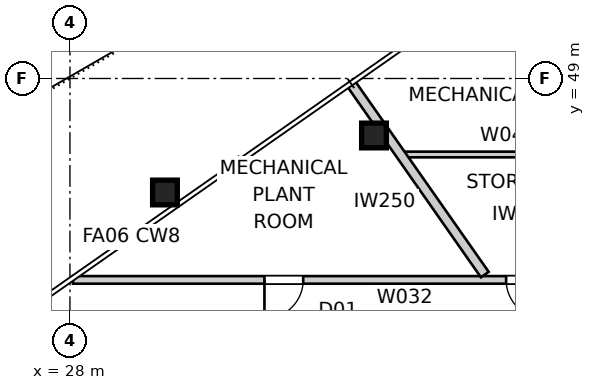
"""IFC4 building model, lengths in metres.
Left out: names, types, materials, properties, quantities, classifications, styles, units other than length and angle.
Written with IfcOpenShell. Run it as: python <this file> out.ifc"""

import sys

from ifc_helpers import new_model, si_unit, direction, frame, frame_2d, origin, origin_2d, place, context, subcontext, project, spatial, rectangle, extrude, element, fill, save


model = new_model("IFC4")
c1 = context("Model", 3, precision=1e-05, world=origin(), true_north=direction((0.0, 1.0)))
c2 = subcontext(c1, "Body", "Model", "MODEL_VIEW")
j1 = project(units=[si_unit("LENGTHUNIT", "METRE"), si_unit("PLANEANGLEUNIT", "RADIAN")], contexts=[c1])
p1 = place(None, origin())
s1 = spatial("IfcSite", under=j1, at=p1, CompositionType="ELEMENT")
p2 = place(p1, origin())
s2 = spatial("IfcBuilding", under=s1, at=p2, CompositionType="ELEMENT")
p3 = place(p2, frame((0.0, 0.0, 235.4)))
s3 = spatial("IfcBuildingStorey", under=s2, at=p3, CompositionType="ELEMENT", Elevation=235.4)
for number, where, z_axis, x_axis in (
    (1, (36.0, 47.5, 0.0), (0.0, 0.0, 1.0), (1.0, 0.0, 0.0)),
    (2, (30.5, 46.0, 0.0), (0.0, 0.0, 1.0), (1.0, 0.0, 0.0)),
):
    element("IfcColumn", number, at=place(p3, frame(where, z_axis=z_axis, x_axis=x_axis)), inside=s3, PredefinedType="COLUMN", context=c2, shape_type="SweptSolid", body=[
        extrude(rectangle(XDim=0.65, YDim=0.65, at=origin_2d()), origin(), (0.0, 0.0, 1.0), 5.0),
    ])
p4 = place(p3, frame((52.454, 43.7, 0.0), z_axis=(0.0, 0.0, 1.0), x_axis=(-1.0, 0.0, 0.0)))
e3 = element("IfcWall", 3, at=p4, inside=s3, PredefinedType="PARTITIONING", context=c2, shape_type="SweptSolid", body=[
    extrude(rectangle(XDim=24.375, YDim=0.2, at=frame_2d((12.188, 0.0))), origin(), (0.0, 0.0, 1.0), 4.85),
])
p5 = place(p4, frame((18.317, 0.0, 0.0)))
e4 = element("IfcOpeningElement", 4, at=p5, cuts=e3, PredefinedType="OPENING", context=c2, shape_type="SweptSolid", body=[
    extrude(rectangle(XDim=1.02, YDim=2.34, at=frame_2d((0.51, 1.17))), frame((0.0, 0.11, 0.0), z_axis=(0.0, -1.0, 0.0), x_axis=(1.0, 0.0, 0.0)), (0.0, 0.0, 1.0), 0.22),
])
p6 = place(p4, frame((2.31, 0.0, 0.0)))
e5 = element("IfcOpeningElement", 5, at=p6, cuts=e3, PredefinedType="OPENING", context=c2, shape_type="SweptSolid", body=[
    extrude(rectangle(XDim=1.02, YDim=2.34, at=frame_2d((0.51, 1.17))), frame((0.0, 0.11, 0.0), z_axis=(0.0, -1.0, 0.0), x_axis=(1.0, 0.0, 0.0)), (0.0, 0.0, 1.0), 0.22),
])
p7 = place(p4, frame((9.119, 0.0, 0.0)))
e6 = element("IfcOpeningElement", 6, at=p7, cuts=e3, PredefinedType="OPENING", context=c2, shape_type="SweptSolid", body=[
    extrude(rectangle(XDim=1.02, YDim=2.34, at=frame_2d((0.51, 1.17))), frame((0.0, 0.11, 0.0), z_axis=(0.0, -1.0, 0.0), x_axis=(1.0, 0.0, 0.0)), (0.0, 0.0, 1.0), 0.22),
])
p8 = place(p4, frame((5.934, 0.0, 0.0)))
e7 = element("IfcOpeningElement", 7, at=p8, cuts=e3, PredefinedType="OPENING", context=c2, shape_type="SweptSolid", body=[
    extrude(rectangle(XDim=1.02, YDim=2.34, at=frame_2d((0.51, 1.17))), frame((0.0, 0.11, 0.0), z_axis=(0.0, -1.0, 0.0), x_axis=(1.0, 0.0, 0.0)), (0.0, 0.0, 1.0), 0.22),
])
p9 = place(p4, frame((11.957, 0.0, 0.0)))
e8 = element("IfcOpeningElement", 8, at=p9, cuts=e3, PredefinedType="OPENING", context=c2, shape_type="SweptSolid", body=[
    extrude(rectangle(XDim=1.02, YDim=2.34, at=frame_2d((0.51, 1.17))), frame((0.0, 0.11, 0.0), z_axis=(0.0, -1.0, 0.0), x_axis=(1.0, 0.0, 0.0)), (0.0, 0.0, 1.0), 0.22),
])
p10 = place(p3, frame((35.393, 48.87, 0.0), z_axis=(0.0, 0.0, 1.0), x_axis=(0.573561042841, -0.819162822725, 0.0)))
e9 = element("IfcWall", 9, at=p10, inside=s3, PredefinedType="PARTITIONING", context=c2, shape_type="SweptSolid", body=[
    extrude(rectangle(XDim=6.142, YDim=0.25, at=frame_2d((3.071, 0.0))), origin(), (0.0, 0.0, 1.0), 4.85),
])
p11 = place(p3, frame((36.703, 47.0, 0.0), z_axis=(0.0, 0.0, 1.0), x_axis=(1.0, 0.0, 0.0)))
e10 = element("IfcWall", 10, at=p11, inside=s3, PredefinedType="SOLIDWALL", context=c2, shape_type="SweptSolid", body=[
    extrude(rectangle(XDim=8.285, YDim=0.15, at=frame_2d((4.143, 0.0))), origin(), (0.0, 0.0, 1.0), 4.85),
])
p12 = place(p11, frame((5.662, 0.0, 0.0)))
e11 = element("IfcOpeningElement", 11, at=p12, cuts=e10, PredefinedType="OPENING", context=c2, shape_type="SweptSolid", body=[
    extrude(rectangle(XDim=0.92, YDim=2.1, at=frame_2d((0.46, 1.05))), frame((0.0, 0.085, 0.0), z_axis=(0.0, -1.0, 0.0), x_axis=(1.0, 0.0, 0.0)), (0.0, 0.0, 1.0), 0.17),
])
p13 = place(p5, origin())
e12 = element("IfcDoor", 12, at=p13, inside=s3, OperationType="SINGLE_SWING_RIGHT", PredefinedType="DOOR", context=c2, shape_type="SweptSolid", body=[
    extrude(rectangle(XDim=1.02, YDim=2.34, at=frame_2d((0.51, 1.17))), frame((0.0, 0.025, 0.0), z_axis=(0.0, -1.0, 0.0), x_axis=(1.0, 0.0, 0.0)), (0.0, 0.0, 1.0), 0.05),
])
fill(e4, e12)
p14 = place(p9, origin())
e13 = element("IfcDoor", 13, at=p14, inside=s3, OperationType="SINGLE_SWING_LEFT", PredefinedType="DOOR", context=c2, shape_type="SweptSolid", body=[
    extrude(rectangle(XDim=1.02, YDim=2.34, at=frame_2d((0.51, 1.17))), frame((0.0, 0.025, 0.0), z_axis=(0.0, -1.0, 0.0), x_axis=(1.0, 0.0, 0.0)), (0.0, 0.0, 1.0), 0.05),
])
fill(e8, e13)
save(model, sys.argv[1])
